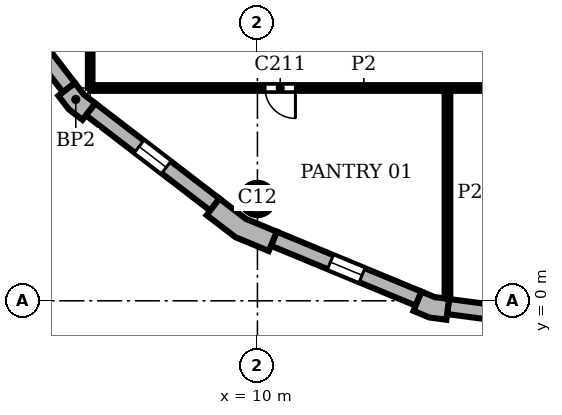
"""IFC4 building model, lengths in metres.
Left out: names, types, materials, properties, quantities, classifications, styles, units other than length and angle.
Written with IfcOpenShell. Run it as: python <this file> out.ifc"""

import sys

from ifc_helpers import new_model, si_unit, direction, frame, frame_2d, origin, origin_2d, place, context, subcontext, project, spatial, polyline, rectangle, circle, outline, extrude, element, fill, save


model = new_model("IFC4")
c1 = context("Model", 3, precision=1e-05, world=origin(), true_north=direction((0.0, 1.0)))
c2 = subcontext(c1, "Body", "Model", "MODEL_VIEW")
j1 = project(units=[si_unit("LENGTHUNIT", "METRE"), si_unit("PLANEANGLEUNIT", "RADIAN")], contexts=[c1])
p1 = place(None, origin())
s1 = spatial("IfcSite", under=j1, at=p1, CompositionType="ELEMENT")
p2 = place(p1, origin())
s2 = spatial("IfcBuilding", under=s1, at=p2, CompositionType="ELEMENT")
p3 = place(p2, frame((0.0, 0.0, 263.1)))
s3 = spatial("IfcBuildingStorey", under=s2, at=p3, CompositionType="ELEMENT", Elevation=263.1)
p4 = place(p3, frame((10.0, 2.679, 0.0), z_axis=(0.0, 0.0, 1.0), x_axis=(1.0, 0.0, 0.0)))
e1 = element("IfcColumn", 1, at=p4, inside=s3, PredefinedType="COLUMN", context=c2, shape_type="SweptSolid", body=[
    extrude(circle(Radius=0.425, at=origin_2d()), origin(), (0.0, 0.0, 1.0), 3.9),
])
p5 = place(p3, origin())
e2 = element("IfcWall", 2, at=p5, inside=s3, PredefinedType="SOLIDWALL", context=c2, shape_type="SweptSolid", body=[
    extrude(outline(polyline([(4.882, 5.487), (4.763, 5.396), (5.038, 5.038), (5.396, 4.763), (5.487, 4.882), (5.731, 5.199), (5.43, 5.43), (5.199, 5.731), (4.882, 5.487)])), origin(), (0.0, 0.0, 1.0), 3.9),
])
e3 = element("IfcWall", 3, at=p5, inside=s3, PredefinedType="SOLIDWALL", context=c2, shape_type="SweptSolid", body=[
    extrude(outline(polyline([(8.757, 2.373), (8.665, 2.254), (9.42, 1.675), (10.299, 1.311), (10.356, 1.449), (10.51, 1.819), (9.698, 2.155), (9.0, 2.69), (8.757, 2.373)])), origin(), (0.0, 0.0, 1.0), 3.9),
])
e4 = element("IfcWall", 4, at=p5, inside=s3, PredefinedType="SOLIDWALL", context=c2, shape_type="SweptSolid", body=[
    extrude(outline(polyline([(14.164, -0.128), (14.106, -0.266), (14.523, -0.439), (14.971, -0.498), (14.99, -0.349), (15.043, 0.047), (14.667, 0.097), (14.317, 0.242), (14.164, -0.128)])), origin(), (0.0, 0.0, 1.0), 3.9),
])
p6 = place(p3, frame((2.532, 8.878, 0.0), z_axis=(0.0, 0.0, 1.0), x_axis=(0.608759824817, -0.793354571229, 0.0)))
e5 = element("IfcWall", 5, at=p6, inside=s3, PredefinedType="SOLIDWALL", context=c2, shape_type="SweptSolid", body=[
    extrude(rectangle(XDim=4.121, YDim=0.4, at=frame_2d((2.061, 0.0))), origin(), (0.0, 0.0, 1.0), 3.9),
])
p7 = place(p6, frame((1.611, 0.0, 0.9)))
e6 = element("IfcOpeningElement", 6, at=p7, cuts=e5, PredefinedType="OPENING", context=c2, shape_type="SweptSolid", body=[
    extrude(rectangle(XDim=0.9, YDim=2.35, at=frame_2d((0.45, 1.175))), frame((0.0, 0.21, 0.0), z_axis=(0.0, -1.0, 0.0), x_axis=(1.0, 0.0, 0.0)), (0.0, 0.0, 1.0), 0.42),
])
p8 = place(p3, frame((5.609, 5.041, 0.0), z_axis=(0.0, 0.0, 1.0), x_axis=(0.793354571229, -0.608759824817, 0.0)))
e7 = element("IfcWall", 7, at=p8, inside=s3, PredefinedType="SOLIDWALL", context=c2, shape_type="SweptSolid", body=[
    extrude(rectangle(XDim=4.121, YDim=0.4, at=frame_2d((2.061, 0.0))), origin(), (0.0, 0.0, 1.0), 3.9),
])
p9 = place(p8, frame((1.611, 0.0, 0.9)))
e8 = element("IfcOpeningElement", 8, at=p9, cuts=e7, PredefinedType="OPENING", context=c2, shape_type="SweptSolid", body=[
    extrude(rectangle(XDim=0.9, YDim=2.35, at=frame_2d((0.45, 1.175))), frame((0.0, 0.21, 0.0), z_axis=(0.0, -1.0, 0.0), x_axis=(1.0, 0.0, 0.0)), (0.0, 0.0, 1.0), 0.42),
])
p10 = place(p3, frame((10.433, 1.634, 0.0), z_axis=(0.0, 0.0, 1.0), x_axis=(0.923863744394, -0.382721546029, 0.0)))
e9 = element("IfcWall", 9, at=p10, inside=s3, PredefinedType="SOLIDWALL", context=c2, shape_type="SweptSolid", body=[
    extrude(rectangle(XDim=4.121, YDim=0.4, at=frame_2d((2.061, 0.0))), origin(), (0.0, 0.0, 1.0), 3.9),
])
p11 = place(p10, frame((1.611, 0.0, 0.9)))
e10 = element("IfcOpeningElement", 10, at=p11, cuts=e9, PredefinedType="OPENING", context=c2, shape_type="SweptSolid", body=[
    extrude(rectangle(XDim=0.9, YDim=2.35, at=frame_2d((0.45, 1.175))), frame((0.0, 0.21, 0.0), z_axis=(0.0, -1.0, 0.0), x_axis=(1.0, 0.0, 0.0)), (0.0, 0.0, 1.0), 0.42),
])
p12 = place(p3, frame((15.017, -0.151, 0.0), z_axis=(0.0, 0.0, 1.0), x_axis=(0.991446429508, -0.130514280502, 0.0)))
e11 = element("IfcWall", 11, at=p12, inside=s3, PredefinedType="SOLIDWALL", context=c2, shape_type="SweptSolid", body=[
    extrude(rectangle(XDim=4.121, YDim=0.4, at=frame_2d((2.061, 0.0))), origin(), (0.0, 0.0, 1.0), 3.9),
])
p13 = place(p12, frame((1.611, 0.0, 0.9)))
e12 = element("IfcOpeningElement", 12, at=p13, cuts=e11, PredefinedType="OPENING", context=c2, shape_type="SweptSolid", body=[
    extrude(rectangle(XDim=0.9, YDim=2.35, at=frame_2d((0.45, 1.175))), frame((0.0, 0.21, 0.0), z_axis=(0.0, -1.0, 0.0), x_axis=(1.0, 0.0, 0.0)), (0.0, 0.0, 1.0), 0.42),
])
p14 = place(p3, frame((15.0, 0.063, 0.0), z_axis=(0.0, 0.0, 1.0), x_axis=(0.0, 1.0, 0.0)))
e13 = element("IfcWall", 13, at=p14, inside=s3, PredefinedType="PARTITIONING", context=c2, shape_type="SweptSolid", body=[
    extrude(rectangle(XDim=5.537, YDim=0.15, at=frame_2d((2.769, 0.0))), origin(), (0.0, 0.0, 1.0), 3.58),
])
p15 = place(p3, frame((5.6, 5.6, 0.0), z_axis=(0.0, 0.0, 1.0), x_axis=(1.0, 0.0, 0.0)))
e14 = element("IfcWall", 14, at=p15, inside=s3, PredefinedType="PARTITIONING", context=c2, shape_type="SweptSolid", body=[
    extrude(rectangle(XDim=14.4, YDim=0.15, at=frame_2d((7.2, 0.0))), origin(), (0.0, 0.0, 1.0), 3.58),
])
p16 = place(p15, frame((4.6, 0.0, 0.0)))
e15 = element("IfcOpeningElement", 15, at=p16, cuts=e14, PredefinedType="OPENING", context=c2, shape_type="SweptSolid", body=[
    extrude(rectangle(XDim=0.8, YDim=2.1, at=frame_2d((0.4, 1.05))), frame((0.0, 0.085, 0.0), z_axis=(0.0, -1.0, 0.0), x_axis=(1.0, 0.0, 0.0)), (0.0, 0.0, 1.0), 0.17),
])
p17 = place(p15, frame((11.25, 0.0, 0.0)))
e16 = element("IfcOpeningElement", 16, at=p17, cuts=e14, PredefinedType="OPENING", context=c2, shape_type="SweptSolid", body=[
    extrude(rectangle(XDim=1.0, YDim=2.1, at=frame_2d((0.5, 1.05))), frame((0.0, 0.085, 0.0), z_axis=(0.0, -1.0, 0.0), x_axis=(1.0, 0.0, 0.0)), (0.0, 0.0, 1.0), 0.17),
])
p18 = place(p3, frame((5.6, 5.6, 0.0), z_axis=(0.0, 0.0, 1.0), x_axis=(0.0, 1.0, 0.0)))
e17 = element("IfcWall", 17, at=p18, inside=s3, PredefinedType="PARTITIONING", context=c2, shape_type="SweptSolid", body=[
    extrude(rectangle(XDim=14.4, YDim=0.12, at=frame_2d((7.2, 0.0))), origin(), (0.0, 0.0, 1.0), 3.58),
])
p19 = place(p18, frame((4.1, 0.0, 0.0)))
e18 = element("IfcOpeningElement", 18, at=p19, cuts=e17, PredefinedType="OPENING", context=c2, shape_type="SweptSolid", body=[
    extrude(rectangle(XDim=1.0, YDim=2.1, at=frame_2d((0.5, 1.05))), frame((0.0, 0.07, 0.0), z_axis=(0.0, -1.0, 0.0), x_axis=(1.0, 0.0, 0.0)), (0.0, 0.0, 1.0), 0.14),
])
p20 = place(p18, frame((11.75, 0.0, 0.0)))
e19 = element("IfcOpeningElement", 19, at=p20, cuts=e17, PredefinedType="OPENING", context=c2, shape_type="SweptSolid", body=[
    extrude(rectangle(XDim=1.0, YDim=2.1, at=frame_2d((0.5, 1.05))), frame((0.0, 0.07, 0.0), z_axis=(0.0, -1.0, 0.0), x_axis=(1.0, 0.0, 0.0)), (0.0, 0.0, 1.0), 0.14),
])
p21 = place(p9, origin())
e20 = element("IfcWindow", 20, at=p21, inside=s3, PartitioningType="SINGLE_PANEL", PredefinedType="WINDOW", context=c2, shape_type="SweptSolid", body=[
    extrude(rectangle(XDim=0.9, YDim=2.35, at=frame_2d((0.45, 1.175))), frame((0.0, 0.16, 0.0), z_axis=(0.0, -1.0, 0.0), x_axis=(1.0, 0.0, 0.0)), (0.0, 0.0, 1.0), 0.06),
])
fill(e8, e20)
p22 = place(p11, origin())
e21 = element("IfcWindow", 21, at=p22, inside=s3, PartitioningType="SINGLE_PANEL", PredefinedType="WINDOW", context=c2, shape_type="SweptSolid", body=[
    extrude(rectangle(XDim=0.9, YDim=2.35, at=frame_2d((0.45, 1.175))), frame((0.0, 0.16, 0.0), z_axis=(0.0, -1.0, 0.0), x_axis=(1.0, 0.0, 0.0)), (0.0, 0.0, 1.0), 0.06),
])
fill(e10, e21)
p23 = place(p16, frame((0.8, 0.0, 0.0), z_axis=(0.0, 0.0, 1.0), x_axis=(-1.0, 0.0, 0.0)))
e22 = element("IfcDoor", 22, at=p23, inside=s3, OperationType="SINGLE_SWING_LEFT", PredefinedType="DOOR", context=c2, shape_type="SweptSolid", body=[
    extrude(rectangle(XDim=0.8, YDim=2.1, at=frame_2d((0.4, 1.05))), frame((0.0, 0.025, 0.0), z_axis=(0.0, -1.0, 0.0), x_axis=(1.0, 0.0, 0.0)), (0.0, 0.0, 1.0), 0.05),
])
fill(e15, e22)
save(model, sys.argv[1])
